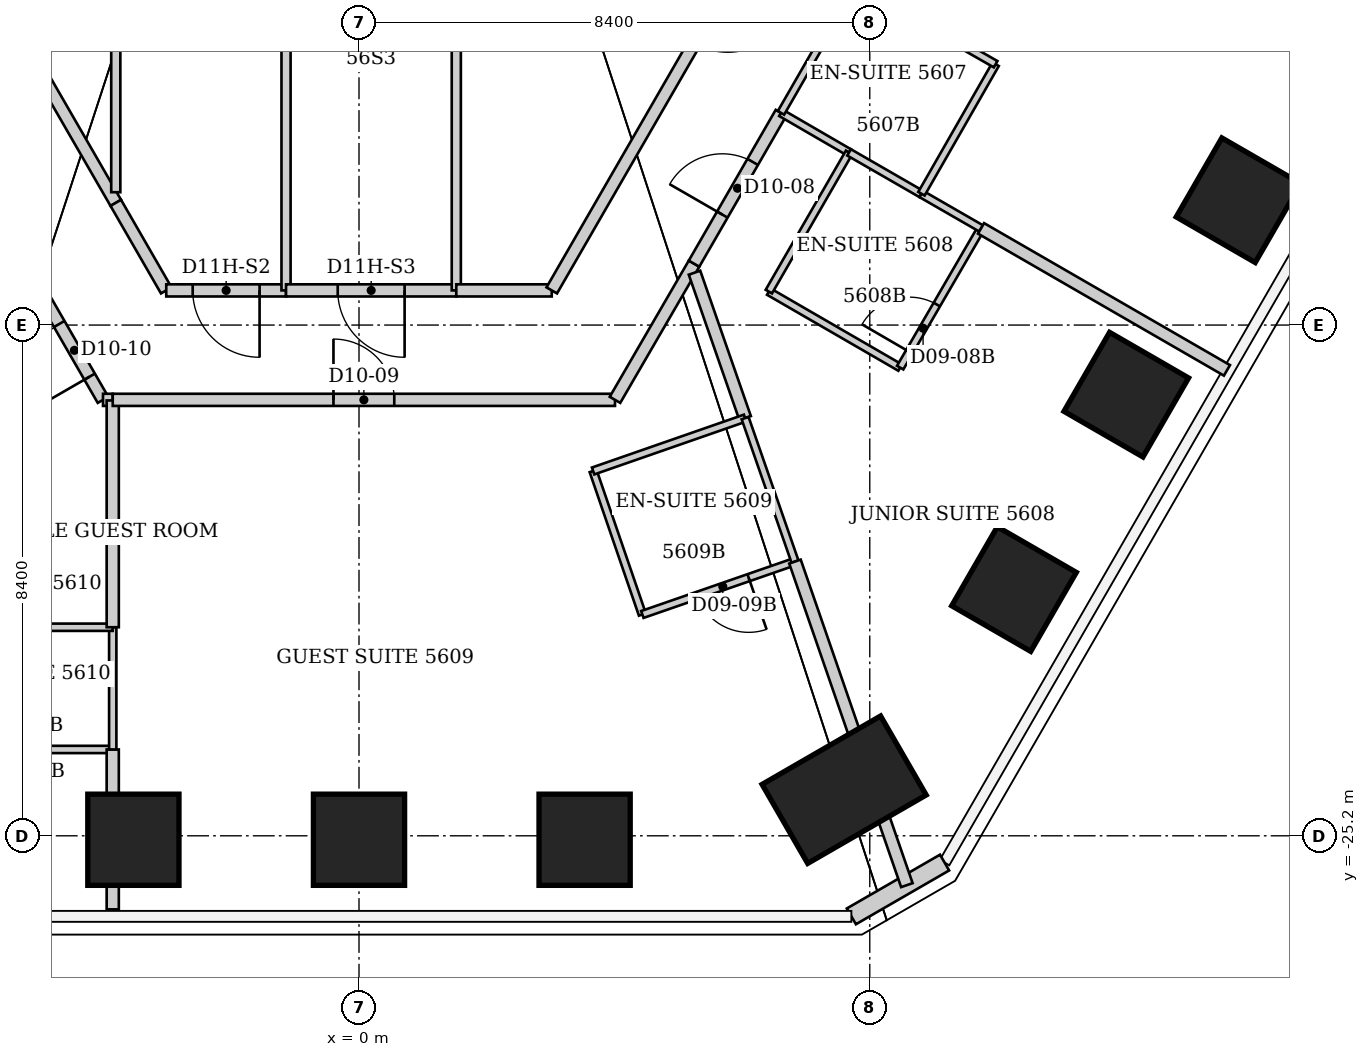
"""IFC4 building model, lengths in metres.
Left out: names, types, materials, properties, quantities, classifications, styles, units other than length and angle.
Written with IfcOpenShell. Run it as: python <this file> out.ifc"""

import sys

from ifc_helpers import new_model, si_unit, direction, frame, frame_2d, origin, origin_2d, place, context, subcontext, project, spatial, rectangle, extrude, element, fill, save


model = new_model("IFC4")
c1 = context("Model", 3, precision=1e-05, world=origin(), true_north=direction((0.0, 1.0)))
c2 = subcontext(c1, "Body", "Model", "MODEL_VIEW")
j1 = project(units=[si_unit("LENGTHUNIT", "METRE"), si_unit("PLANEANGLEUNIT", "RADIAN")], contexts=[c1])
p1 = place(None, origin())
s1 = spatial("IfcSite", under=j1, at=p1, CompositionType="ELEMENT")
p2 = place(p1, origin())
s2 = spatial("IfcBuilding", under=s1, at=p2, CompositionType="ELEMENT")
p3 = place(p2, frame((0.0, 0.0, 225.0)))
s3 = spatial("IfcBuildingStorey", under=s2, at=p3, CompositionType="ELEMENT", Elevation=225.0)
for number, where, z_axis, x_axis in (
    (1, (16.311, -11.549, 0.0), (0.0, 0.0, 1.0), (0.866, -0.5, 0.0)),
    (2, (14.465, -14.747, 0.0), (0.0, 0.0, 1.0), (0.866, -0.5, 0.0)),
    (3, (12.618, -17.945, 0.0), (0.0, 0.0, 1.0), (0.866, -0.5, 0.0)),
    (4, (10.772, -21.142, 0.0), (0.0, 0.0, 1.0), (0.866, -0.5, 0.0)),
):
    element("IfcColumn", number, at=place(p3, frame(where, z_axis=z_axis, x_axis=x_axis)), inside=s3, PredefinedType="COLUMN", context=c2, shape_type="SweptSolid", body=[
        extrude(rectangle(XDim=1.5, YDim=1.5, at=origin_2d()), origin(), (0.0, 0.0, 1.0), 3.8),
    ])
p4 = place(p3, frame((7.979, -24.442, 0.0), z_axis=(0.0, 0.0, 1.0), x_axis=(0.5, -0.866025403784, 0.0)))
e5 = element("IfcColumn", 5, at=p4, inside=s3, PredefinedType="COLUMN", context=c2, shape_type="SweptSolid", body=[
    extrude(rectangle(XDim=1.5, YDim=2.25, at=origin_2d()), origin(), (0.0, 0.0, 1.0), 3.8),
])
for number, where, z_axis, x_axis in (
    (6, (3.71, -25.265, 0.0), (0.0, 0.0, 1.0), (0.0, -1.0, 0.0)),
    (7, (0.0, -25.265, 0.0), (0.0, 0.0, 1.0), (0.0, -1.0, 0.0)),
    (8, (-3.71, -25.265, 0.0), (0.0, 0.0, 1.0), (0.0, -1.0, 0.0)),
):
    element("IfcColumn", number, at=place(p3, frame(where, z_axis=z_axis, x_axis=x_axis)), inside=s3, PredefinedType="COLUMN", context=c2, shape_type="SweptSolid", body=[
        extrude(rectangle(XDim=1.5, YDim=1.5, at=origin_2d()), origin(), (0.0, 0.0, 1.0), 3.8),
    ])
p5 = place(p3, frame((9.63, -25.64, 0.0), z_axis=(0.0, 0.0, 1.0), x_axis=(-0.866036293601, -0.499981137809, 0.0)))
e9 = element("IfcWall", 9, at=p5, inside=s3, PredefinedType="SOLIDWALL", context=c2, shape_type="SweptSolid", body=[
    extrude(rectangle(XDim=1.77, YDim=0.3, at=frame_2d((0.885, 0.0))), origin(), (0.0, 0.0, 1.0), 3.64),
])
p6 = place(p3, frame((-6.45, -23.78, 0.0), z_axis=(0.0, 0.0, 1.0), x_axis=(1.0, 0.0, 0.0)))
e10 = element("IfcWall", 10, at=p6, inside=s3, PredefinedType="PARTITIONING", context=c2, shape_type="SweptSolid", body=[
    extrude(rectangle(XDim=2.4, YDim=0.12, at=frame_2d((1.2, 0.0))), origin(), (0.0, 0.0, 1.0), 3.64),
])
p7 = place(p6, frame((0.45, 0.0, 0.0)))
e11 = element("IfcOpeningElement", 11, at=p7, cuts=e10, PredefinedType="OPENING", context=c2, shape_type="SweptSolid", body=[
    extrude(rectangle(XDim=0.9, YDim=2.03, at=frame_2d((0.45, 1.015))), frame((0.0, 0.06, 0.0), z_axis=(0.0, -1.0, 0.0), x_axis=(1.0, 0.0, 0.0)), (0.0, 0.0, 1.0), 0.12),
])
p8 = place(p3, frame((-5.48, -15.83, 0.0), z_axis=(0.0, 0.0, 1.0), x_axis=(0.499963722229, -0.866046347752, 0.0)))
e12 = element("IfcWall", 12, at=p8, inside=s3, PredefinedType="PARTITIONING", context=c2, shape_type="SweptSolid", body=[
    extrude(rectangle(XDim=2.54, YDim=0.2, at=frame_2d((1.27, 0.0))), origin(), (0.0, 0.0, 1.0), 3.64),
])
p9 = place(p8, frame((1.1, 0.0, 0.0)))
e13 = element("IfcOpeningElement", 13, at=p9, cuts=e12, PredefinedType="OPENING", context=c2, shape_type="SweptSolid", body=[
    extrude(rectangle(XDim=1.0, YDim=2.13, at=frame_2d((0.5, 1.065))), frame((0.0, 0.1, 0.0), z_axis=(0.0, -1.0, 0.0), x_axis=(1.0, 0.0, 0.0)), (0.0, 0.0, 1.0), 0.2),
])
p10 = place(p3, frame((-4.21, -18.03, 0.0), z_axis=(0.0, 0.0, 1.0), x_axis=(1.0, 0.0, 0.0)))
e14 = element("IfcWall", 14, at=p10, inside=s3, PredefinedType="PARTITIONING", context=c2, shape_type="SweptSolid", body=[
    extrude(rectangle(XDim=0.16, YDim=0.2, at=frame_2d((0.08, 0.0))), origin(), (0.0, 0.0, 1.0), 3.64),
])
p11 = place(p3, frame((-4.05, -26.41, 0.0), z_axis=(0.0, 0.0, 1.0), x_axis=(0.0, 1.0, 0.0)))
e15 = element("IfcWall", 15, at=p11, inside=s3, PredefinedType="PARTITIONING", context=c2, shape_type="SweptSolid", body=[
    extrude(rectangle(XDim=2.63, YDim=0.2, at=frame_2d((1.315, 0.0))), origin(), (0.0, 0.0, 1.0), 3.64),
])
p12 = place(p3, frame((-4.05, -23.78, 0.0), z_axis=(0.0, 0.0, 1.0), x_axis=(0.0, 1.0, 0.0)))
e16 = element("IfcWall", 16, at=p12, inside=s3, PredefinedType="PARTITIONING", context=c2, shape_type="SweptSolid", body=[
    extrude(rectangle(XDim=2.01, YDim=0.12, at=frame_2d((1.005, 0.0))), origin(), (0.0, 0.0, 1.0), 3.64),
])
p13 = place(p3, frame((-4.05, -21.77, 0.0), z_axis=(0.0, 0.0, 1.0), x_axis=(-1.0, 0.0, 0.0)))
e17 = element("IfcWall", 17, at=p13, inside=s3, PredefinedType="PARTITIONING", context=c2, shape_type="SweptSolid", body=[
    extrude(rectangle(XDim=2.4, YDim=0.12, at=frame_2d((1.2, 0.0))), origin(), (0.0, 0.0, 1.0), 3.64),
])
p14 = place(p3, frame((-4.05, -21.77, 0.0), z_axis=(0.0, 0.0, 1.0), x_axis=(0.0, 1.0, 0.0)))
e18 = element("IfcWall", 18, at=p14, inside=s3, PredefinedType="PARTITIONING", context=c2, shape_type="SweptSolid", body=[
    extrude(rectangle(XDim=3.73, YDim=0.2, at=frame_2d((1.865, 0.0))), origin(), (0.0, 0.0, 1.0), 3.64),
])
p15 = place(p3, frame((-4.05, -18.03, 0.0), z_axis=(0.0, 0.0, 1.0), x_axis=(1.0, 0.0, 0.0)))
e19 = element("IfcWall", 19, at=p15, inside=s3, PredefinedType="PARTITIONING", context=c2, shape_type="SweptSolid", body=[
    extrude(rectangle(XDim=8.26, YDim=0.2, at=frame_2d((4.13, 0.0))), origin(), (0.0, 0.0, 1.0), 3.64),
])
p16 = place(p15, frame((3.63, 0.0, 0.0)))
e20 = element("IfcOpeningElement", 20, at=p16, cuts=e19, PredefinedType="OPENING", context=c2, shape_type="SweptSolid", body=[
    extrude(rectangle(XDim=1.0, YDim=2.13, at=frame_2d((0.5, 1.065))), frame((0.0, 0.1, 0.0), z_axis=(0.0, -1.0, 0.0), x_axis=(1.0, 0.0, 0.0)), (0.0, 0.0, 1.0), 0.2),
])
p17 = place(p3, frame((-4.0, -14.79, 0.0), z_axis=(0.0, 0.0, 1.0), x_axis=(-0.499916512745, 0.866073599808, 0.0)))
e21 = element("IfcWall", 21, at=p17, inside=s3, PredefinedType="PARTITIONING", context=c2, shape_type="SweptSolid", body=[
    extrude(rectangle(XDim=8.821, YDim=0.2, at=frame_2d((4.411, 0.0))), origin(), (0.0, 0.0, 1.0), 3.64),
])
p18 = place(p17, frame((3.861, 0.0, 0.0)))
e22 = element("IfcOpeningElement", 22, at=p18, cuts=e21, PredefinedType="OPENING", context=c2, shape_type="SweptSolid", body=[
    extrude(rectangle(XDim=1.1, YDim=2.2, at=frame_2d((0.55, 1.1))), frame((0.0, 0.1, 0.0), z_axis=(0.0, -1.0, 0.0), x_axis=(1.0, 0.0, 0.0)), (0.0, 0.0, 1.0), 0.2),
])
p19 = place(p3, frame((-4.0, -7.1, 0.0), z_axis=(0.0, 0.0, 1.0), x_axis=(0.0, -1.0, 0.0)))
e23 = element("IfcWall", 23, at=p19, inside=s3, PredefinedType="PARTITIONING", context=c2, shape_type="SweptSolid", body=[
    extrude(rectangle(XDim=7.515, YDim=0.15, at=frame_2d((3.757, 0.0))), origin(), (0.0, 0.0, 1.0), 3.64),
])
p20 = place(p3, frame((-3.17, -16.23, 0.0), z_axis=(0.0, 0.0, 1.0), x_axis=(-0.499425709803, 0.866356716594, 0.0)))
e24 = element("IfcWall", 24, at=p20, inside=s3, PredefinedType="PARTITIONING", context=c2, shape_type="SweptSolid", body=[
    extrude(rectangle(XDim=1.662, YDim=0.2, at=frame_2d((0.831, 0.0))), origin(), (0.0, 0.0, 1.0), 3.64),
])
p21 = place(p3, frame((-1.2, -16.23, 0.0), z_axis=(0.0, 0.0, 1.0), x_axis=(-1.0, 0.0, 0.0)))
e25 = element("IfcWall", 25, at=p21, inside=s3, PredefinedType="PARTITIONING", context=c2, shape_type="SweptSolid", body=[
    extrude(rectangle(XDim=1.97, YDim=0.2, at=frame_2d((0.985, 0.0))), origin(), (0.0, 0.0, 1.0), 3.64),
])
p22 = place(p21, frame((0.435, 0.0, 0.0)))
e26 = element("IfcOpeningElement", 26, at=p22, cuts=e25, PredefinedType="OPENING", context=c2, shape_type="SweptSolid", body=[
    extrude(rectangle(XDim=1.1, YDim=2.2, at=frame_2d((0.55, 1.1))), frame((0.0, 0.1, 0.0), z_axis=(0.0, -1.0, 0.0), x_axis=(1.0, 0.0, 0.0)), (0.0, 0.0, 1.0), 0.2),
])
p23 = place(p3, frame((-1.2, -7.1, 0.0), z_axis=(0.0, 0.0, 1.0), x_axis=(0.0, -1.0, 0.0)))
e27 = element("IfcWall", 27, at=p23, inside=s3, PredefinedType="PARTITIONING", context=c2, shape_type="SweptSolid", body=[
    extrude(rectangle(XDim=9.13, YDim=0.15, at=frame_2d((4.565, 0.0))), origin(), (0.0, 0.0, 1.0), 3.64),
])
p24 = place(p3, frame((1.6, -16.23, 0.0), z_axis=(0.0, 0.0, 1.0), x_axis=(-1.0, 0.0, 0.0)))
e28 = element("IfcWall", 28, at=p24, inside=s3, PredefinedType="PARTITIONING", context=c2, shape_type="SweptSolid", body=[
    extrude(rectangle(XDim=2.8, YDim=0.2, at=frame_2d((1.4, 0.0))), origin(), (0.0, 0.0, 1.0), 3.64),
])
p25 = place(p24, frame((0.85, 0.0, 0.0)))
e29 = element("IfcOpeningElement", 29, at=p25, cuts=e28, PredefinedType="OPENING", context=c2, shape_type="SweptSolid", body=[
    extrude(rectangle(XDim=1.1, YDim=2.2, at=frame_2d((0.55, 1.1))), frame((0.0, 0.1, 0.0), z_axis=(0.0, -1.0, 0.0), x_axis=(1.0, 0.0, 0.0)), (0.0, 0.0, 1.0), 0.2),
])
p26 = place(p3, frame((1.6, -7.1, 0.0), z_axis=(0.0, 0.0, 1.0), x_axis=(0.0, -1.0, 0.0)))
e30 = element("IfcWall", 30, at=p26, inside=s3, PredefinedType="PARTITIONING", context=c2, shape_type="SweptSolid", body=[
    extrude(rectangle(XDim=9.13, YDim=0.15, at=frame_2d((4.565, 0.0))), origin(), (0.0, 0.0, 1.0), 3.64),
])
p27 = place(p3, frame((3.17, -16.23, 0.0), z_axis=(0.0, 0.0, 1.0), x_axis=(-1.0, 0.0, 0.0)))
e31 = element("IfcWall", 31, at=p27, inside=s3, PredefinedType="PARTITIONING", context=c2, shape_type="SweptSolid", body=[
    extrude(rectangle(XDim=1.57, YDim=0.2, at=frame_2d((0.785, 0.0))), origin(), (0.0, 0.0, 1.0), 3.64),
])
p28 = place(p3, frame((3.85, -19.2, 0.0), z_axis=(0.0, 0.0, 1.0), x_axis=(0.324551952924, -0.945867871245, 0.0)))
e32 = element("IfcWall", 32, at=p28, inside=s3, PredefinedType="PARTITIONING", context=c2, shape_type="SweptSolid", body=[
    extrude(rectangle(XDim=2.495, YDim=0.12, at=frame_2d((1.248, 0.0))), origin(), (0.0, 0.0, 1.0), 3.64),
])
p29 = place(p3, frame((4.66, -21.56, 0.0), z_axis=(0.0, 0.0, 1.0), x_axis=(0.944838473769, 0.327536652126, 0.0)))
e33 = element("IfcWall", 33, at=p29, inside=s3, PredefinedType="PARTITIONING", context=c2, shape_type="SweptSolid", body=[
    extrude(rectangle(XDim=2.656, YDim=0.12, at=frame_2d((1.328, 0.0))), origin(), (0.0, 0.0, 1.0), 3.64),
])
p30 = place(p29, frame((0.95, 0.0, 0.0)))
e34 = element("IfcOpeningElement", 34, at=p30, cuts=e33, PredefinedType="OPENING", context=c2, shape_type="SweptSolid", body=[
    extrude(rectangle(XDim=0.9, YDim=2.03, at=frame_2d((0.45, 1.015))), frame((0.0, 0.06, 0.0), z_axis=(0.0, -1.0, 0.0), x_axis=(1.0, 0.0, 0.0)), (0.0, 0.0, 1.0), 0.12),
])
p31 = place(p3, frame((5.51, -15.79, 0.0), z_axis=(0.0, 0.0, 1.0), x_axis=(-0.501964949025, -0.864887963814, 0.0)))
e35 = element("IfcWall", 35, at=p31, inside=s3, PredefinedType="PARTITIONING", context=c2, shape_type="SweptSolid", body=[
    extrude(rectangle(XDim=2.59, YDim=0.2, at=frame_2d((1.295, 0.0))), origin(), (0.0, 0.0, 1.0), 3.64),
])
p32 = place(p3, frame((5.51, -15.79, 0.0), z_axis=(0.0, 0.0, 1.0), x_axis=(0.499505868716, 0.866310502717, 0.0)))
e36 = element("IfcWall", 36, at=p32, inside=s3, PredefinedType="PARTITIONING", context=c2, shape_type="SweptSolid", body=[
    extrude(rectangle(XDim=2.863, YDim=0.2, at=frame_2d((1.431, 0.0))), origin(), (0.0, 0.0, 1.0), 3.64),
])
p33 = place(p32, frame((0.931, 0.0, 0.0)))
e37 = element("IfcOpeningElement", 37, at=p33, cuts=e36, PredefinedType="OPENING", context=c2, shape_type="SweptSolid", body=[
    extrude(rectangle(XDim=1.0, YDim=2.13, at=frame_2d((0.5, 1.065))), frame((0.0, 0.1, 0.0), z_axis=(0.0, -1.0, 0.0), x_axis=(1.0, 0.0, 0.0)), (0.0, 0.0, 1.0), 0.2),
])
p34 = place(p3, frame((5.518, -15.939, 0.0), z_axis=(0.0, 0.0, 1.0), x_axis=(0.328696386896, -0.94443564378, 0.0)))
e38 = element("IfcWall", 38, at=p34, inside=s3, PredefinedType="PARTITIONING", context=c2, shape_type="SweptSolid", body=[
    extrude(rectangle(XDim=2.532, YDim=0.2, at=frame_2d((1.266, 0.0))), origin(), (0.0, 0.0, 1.0), 3.64),
])
p35 = place(p3, frame((6.35, -18.33, 0.0), z_axis=(0.0, 0.0, 1.0), x_axis=(-0.944470666048, -0.328595740956, 0.0)))
e39 = element("IfcWall", 39, at=p35, inside=s3, PredefinedType="PARTITIONING", context=c2, shape_type="SweptSolid", body=[
    extrude(rectangle(XDim=2.647, YDim=0.12, at=frame_2d((1.324, 0.0))), origin(), (0.0, 0.0, 1.0), 3.64),
])
p36 = place(p3, frame((6.35, -18.33, 0.0), z_axis=(0.0, 0.0, 1.0), x_axis=(0.328164304993, -0.944620658745, 0.0)))
e40 = element("IfcWall", 40, at=p36, inside=s3, PredefinedType="PARTITIONING", context=c2, shape_type="SweptSolid", body=[
    extrude(rectangle(XDim=2.498, YDim=0.12, at=frame_2d((1.249, 0.0))), origin(), (0.0, 0.0, 1.0), 3.64),
])
p37 = place(p3, frame((6.74, -16.25, 0.0), z_axis=(0.0, 0.0, 1.0), x_axis=(0.865508881864, -0.500893576935, 0.0)))
e41 = element("IfcWall", 41, at=p37, inside=s3, PredefinedType="PARTITIONING", context=c2, shape_type="SweptSolid", body=[
    extrude(rectangle(XDim=2.496, YDim=0.12, at=frame_2d((1.248, 0.0))), origin(), (0.0, 0.0, 1.0), 3.64),
])
p38 = place(p3, frame((6.94, -13.31, 0.0), z_axis=(0.0, 0.0, 1.0), x_axis=(0.864952631286, -0.501853510132, 0.0)))
e42 = element("IfcWall", 42, at=p38, inside=s3, PredefinedType="PARTITIONING", context=c2, shape_type="SweptSolid", body=[
    extrude(rectangle(XDim=1.295, YDim=0.12, at=frame_2d((0.647, 0.0))), origin(), (0.0, 0.0, 1.0), 3.64),
])
p39 = place(p3, frame((6.94, -13.31, 0.0), z_axis=(0.0, 0.0, 1.0), x_axis=(0.498748634132, 0.866746675766, 0.0)))
e43 = element("IfcWall", 43, at=p39, inside=s3, PredefinedType="PARTITIONING", context=c2, shape_type="SweptSolid", body=[
    extrude(rectangle(XDim=2.446, YDim=0.12, at=frame_2d((1.223, 0.0))), origin(), (0.0, 0.0, 1.0), 3.64),
])
p40 = place(p3, frame((7.17, -20.69, 0.0), z_axis=(0.0, 0.0, 1.0), x_axis=(0.326821657676, -0.945086029985, 0.0)))
e44 = element("IfcWall", 44, at=p40, inside=s3, PredefinedType="PARTITIONING", context=c2, shape_type="SweptSolid", body=[
    extrude(rectangle(XDim=5.631, YDim=0.2, at=frame_2d((2.815, 0.0))), origin(), (0.0, 0.0, 1.0), 3.64),
])
p41 = place(p3, frame((8.06, -13.96, 0.0), z_axis=(0.0, 0.0, 1.0), x_axis=(-0.499407914056, -0.866366975004, 0.0)))
e45 = element("IfcWall", 45, at=p41, inside=s3, PredefinedType="PARTITIONING", context=c2, shape_type="SweptSolid", body=[
    extrude(rectangle(XDim=2.643, YDim=0.12, at=frame_2d((1.322, 0.0))), origin(), (0.0, 0.0, 1.0), 3.64),
])
p42 = place(p3, frame((8.06, -13.96, 0.0), z_axis=(0.0, 0.0, 1.0), x_axis=(0.866505716338, -0.499167149914, 0.0)))
e46 = element("IfcWall", 46, at=p42, inside=s3, PredefinedType="PARTITIONING", context=c2, shape_type="SweptSolid", body=[
    extrude(rectangle(XDim=1.37, YDim=0.12, at=frame_2d((0.685, 0.0))), origin(), (0.0, 0.0, 1.0), 3.64),
])
p43 = place(p3, frame((8.41, -7.15, 0.0), z_axis=(0.0, 0.0, 1.0), x_axis=(-0.499828628176, -0.866124322748, 0.0)))
e47 = element("IfcWall", 47, at=p43, inside=s3, PredefinedType="PARTITIONING", context=c2, shape_type="SweptSolid", body=[
    extrude(rectangle(XDim=10.484, YDim=0.2, at=frame_2d((5.242, 0.0))), origin(), (0.0, 0.0, 1.0), 3.64),
])
p44 = place(p43, frame((4.692, 0.0, 0.0)))
e48 = element("IfcOpeningElement", 48, at=p44, cuts=e47, PredefinedType="OPENING", context=c2, shape_type="SweptSolid", body=[
    extrude(rectangle(XDim=1.1, YDim=2.2, at=frame_2d((0.55, 1.1))), frame((0.0, 0.1, 0.0), z_axis=(0.0, -1.0, 0.0), x_axis=(1.0, 0.0, 0.0)), (0.0, 0.0, 1.0), 0.2),
])
p45 = place(p3, frame((8.9, -17.5, 0.0), z_axis=(0.0, 0.0, 1.0), x_axis=(0.502242265546, 0.864726954997, 0.0)))
e49 = element("IfcWall", 49, at=p45, inside=s3, PredefinedType="PARTITIONING", context=c2, shape_type="SweptSolid", body=[
    extrude(rectangle(XDim=2.648, YDim=0.12, at=frame_2d((1.324, 0.0))), origin(), (0.0, 0.0, 1.0), 3.64),
])
p46 = place(p45, frame((0.3, 0.0, 0.0)))
e50 = element("IfcOpeningElement", 50, at=p46, cuts=e49, PredefinedType="OPENING", context=c2, shape_type="SweptSolid", body=[
    extrude(rectangle(XDim=0.9, YDim=2.03, at=frame_2d((0.45, 1.015))), frame((0.0, 0.06, 0.0), z_axis=(0.0, -1.0, 0.0), x_axis=(1.0, 0.0, 0.0)), (0.0, 0.0, 1.0), 0.12),
])
p47 = place(p3, frame((9.248, -14.644, 0.0), z_axis=(0.0, 0.0, 1.0), x_axis=(0.866515213998, -0.499150662536, 0.0)))
e51 = element("IfcWall", 51, at=p47, inside=s3, PredefinedType="PARTITIONING", context=c2, shape_type="SweptSolid", body=[
    extrude(rectangle(XDim=1.134, YDim=0.12, at=frame_2d((0.567, 0.0))), origin(), (0.0, 0.0, 1.0), 3.64),
])
p48 = place(p3, frame((9.25, -14.64, 0.0), z_axis=(0.0, 0.0, 1.0), x_axis=(0.497027744361, 0.86773464915, 0.0)))
e52 = element("IfcWall", 52, at=p48, inside=s3, PredefinedType="PARTITIONING", context=c2, shape_type="SweptSolid", body=[
    extrude(rectangle(XDim=2.455, YDim=0.12, at=frame_2d((1.227, 0.0))), origin(), (0.0, 0.0, 1.0), 3.64),
])
p49 = place(p3, frame((10.23, -15.21, 0.0), z_axis=(0.0, 0.0, 1.0), x_axis=(0.86600796803, -0.500030198396, 0.0)))
e53 = element("IfcWall", 53, at=p49, inside=s3, PredefinedType="PARTITIONING", context=c2, shape_type="SweptSolid", body=[
    extrude(rectangle(XDim=4.67, YDim=0.2, at=frame_2d((2.335, 0.0))), origin(), (0.0, 0.0, 1.0), 3.64),
])
p50 = place(p3, frame((10.47, -12.51, 0.0), z_axis=(0.0, 0.0, 1.0), x_axis=(-0.86821490448, 0.49618835097, 0.0)))
e54 = element("IfcWall", 54, at=p50, inside=s3, PredefinedType="PARTITIONING", context=c2, shape_type="SweptSolid", body=[
    extrude(rectangle(XDim=2.66, YDim=0.12, at=frame_2d((1.33, 0.0))), origin(), (0.0, 0.0, 1.0), 2.878),
])
p51 = place(p50, frame((1.46, 0.0, 0.0)))
e55 = element("IfcOpeningElement", 55, at=p51, cuts=e54, PredefinedType="OPENING", context=c2, shape_type="SweptSolid", body=[
    extrude(rectangle(XDim=0.9, YDim=2.03, at=frame_2d((0.45, 1.015))), frame((0.0, 0.06, 0.0), z_axis=(0.0, -1.0, 0.0), x_axis=(1.0, 0.0, 0.0)), (0.0, 0.0, 1.0), 0.12),
])
p52 = place(p33, origin())
e56 = element("IfcDoor", 56, at=p52, inside=s3, OperationType="SINGLE_SWING_LEFT", PredefinedType="DOOR", context=c2, shape_type="SweptSolid", body=[
    extrude(rectangle(XDim=1.0, YDim=2.13, at=frame_2d((0.5, 1.065))), frame((0.0, 0.025, 0.0), z_axis=(0.0, -1.0, 0.0), x_axis=(1.0, 0.0, 0.0)), (0.0, 0.0, 1.0), 0.05),
])
fill(e37, e56)
p53 = place(p46, origin())
e57 = element("IfcDoor", 57, at=p53, inside=s3, OperationType="SINGLE_SWING_LEFT", PredefinedType="DOOR", context=c2, shape_type="SweptSolid", body=[
    extrude(rectangle(XDim=0.9, YDim=2.03, at=frame_2d((0.45, 1.015))), frame((0.0, 0.025, 0.0), z_axis=(0.0, -1.0, 0.0), x_axis=(1.0, 0.0, 0.0)), (0.0, 0.0, 1.0), 0.05),
])
fill(e50, e57)
p54 = place(p16, origin())
e58 = element("IfcDoor", 58, at=p54, inside=s3, OperationType="SINGLE_SWING_LEFT", PredefinedType="DOOR", context=c2, shape_type="SweptSolid", body=[
    extrude(rectangle(XDim=1.0, YDim=2.13, at=frame_2d((0.5, 1.065))), frame((0.0, 0.025, 0.0), z_axis=(0.0, -1.0, 0.0), x_axis=(1.0, 0.0, 0.0)), (0.0, 0.0, 1.0), 0.05),
])
fill(e20, e58)
p55 = place(p30, origin())
e59 = element("IfcDoor", 59, at=p55, inside=s3, OperationType="SINGLE_SWING_RIGHT", PredefinedType="DOOR", context=c2, shape_type="SweptSolid", body=[
    extrude(rectangle(XDim=0.9, YDim=2.03, at=frame_2d((0.45, 1.015))), frame((0.0, 0.025, 0.0), z_axis=(0.0, -1.0, 0.0), x_axis=(1.0, 0.0, 0.0)), (0.0, 0.0, 1.0), 0.05),
])
fill(e34, e59)
p56 = place(p9, origin())
e60 = element("IfcDoor", 60, at=p56, inside=s3, OperationType="SINGLE_SWING_RIGHT", PredefinedType="DOOR", context=c2, shape_type="SweptSolid", body=[
    extrude(rectangle(XDim=1.0, YDim=2.13, at=frame_2d((0.5, 1.065))), frame((0.0, 0.025, 0.0), z_axis=(0.0, -1.0, 0.0), x_axis=(1.0, 0.0, 0.0)), (0.0, 0.0, 1.0), 0.05),
])
fill(e13, e60)
p57 = place(p22, origin())
e61 = element("IfcDoor", 61, at=p57, inside=s3, OperationType="SINGLE_SWING_LEFT", PredefinedType="DOOR", context=c2, shape_type="SweptSolid", body=[
    extrude(rectangle(XDim=1.1, YDim=2.2, at=frame_2d((0.55, 1.1))), frame((0.0, 0.025, 0.0), z_axis=(0.0, -1.0, 0.0), x_axis=(1.0, 0.0, 0.0)), (0.0, 0.0, 1.0), 0.05),
])
fill(e26, e61)
p58 = place(p25, origin())
e62 = element("IfcDoor", 62, at=p58, inside=s3, OperationType="SINGLE_SWING_LEFT", PredefinedType="DOOR", context=c2, shape_type="SweptSolid", body=[
    extrude(rectangle(XDim=1.1, YDim=2.2, at=frame_2d((0.55, 1.1))), frame((0.0, 0.025, 0.0), z_axis=(0.0, -1.0, 0.0), x_axis=(1.0, 0.0, 0.0)), (0.0, 0.0, 1.0), 0.05),
])
fill(e29, e62)
save(model, sys.argv[1])
